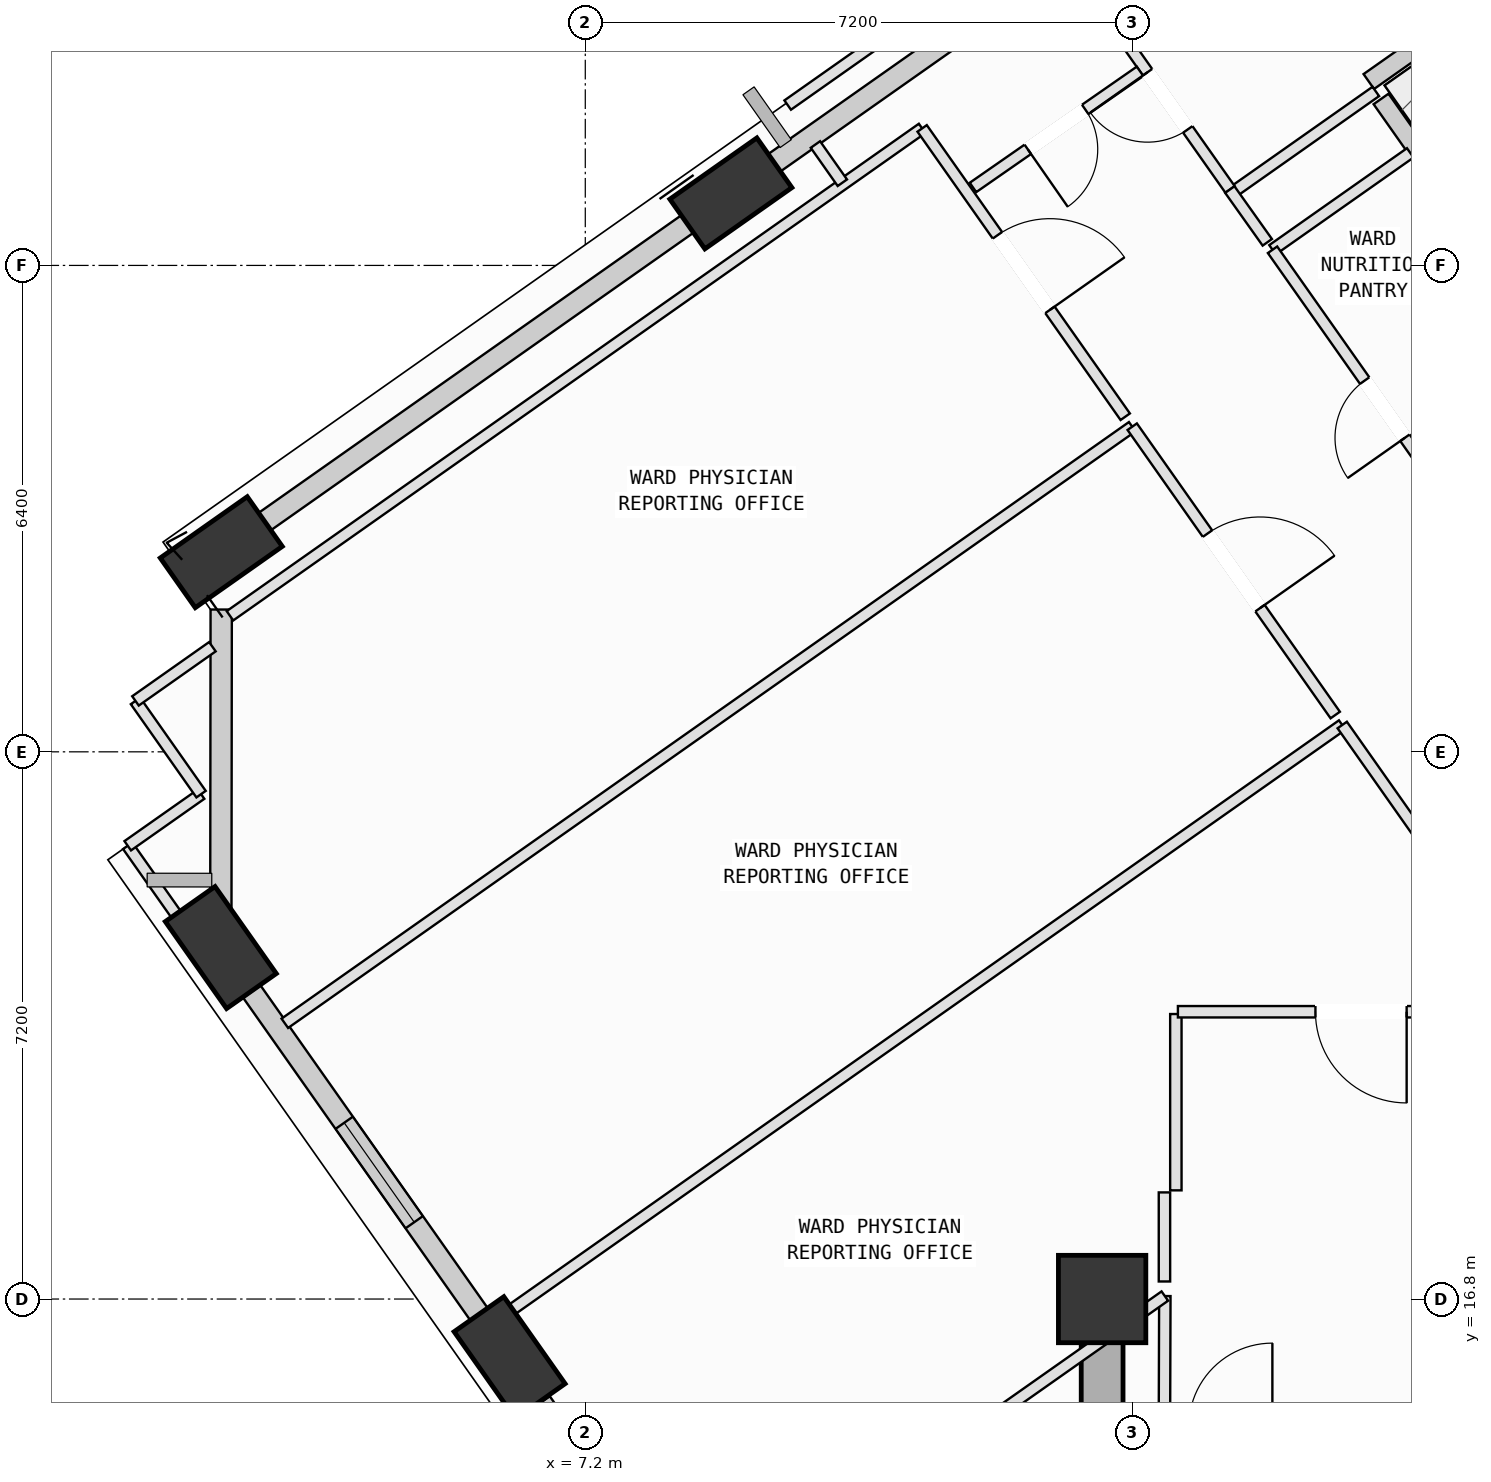
"""IFC4 building model, lengths in metres.
Left out: names, types, materials, properties, quantities, classifications, styles, units other than length and angle.
Written with IfcOpenShell. Run it as: python <this file> out.ifc"""

import sys

from ifc_helpers import new_model, si_unit, direction, frame, frame_2d, origin, origin_2d, place, context, subcontext, project, spatial, rectangle, extrude, element, fill, save


model = new_model("IFC4")
c1 = context("Model", 3, precision=1e-05, world=origin(), true_north=direction((0.0, 1.0)))
c2 = subcontext(c1, "Body", "Model", "MODEL_VIEW")
j1 = project(units=[si_unit("LENGTHUNIT", "METRE"), si_unit("PLANEANGLEUNIT", "RADIAN")], contexts=[c1])
p1 = place(None, origin())
s1 = spatial("IfcSite", under=j1, at=p1, CompositionType="ELEMENT")
p2 = place(p1, origin())
s2 = spatial("IfcBuilding", under=s1, at=p2, CompositionType="ELEMENT")
p3 = place(p2, frame((0.0, 0.0, 173.8)))
s3 = spatial("IfcBuildingStorey", under=s2, at=p3, CompositionType="ELEMENT", Elevation=173.8)
p4 = place(p3, frame((14.0, 16.8, 0.0), z_axis=(0.0, 0.0, 1.0), x_axis=(1.0, 0.0, 0.0)))
e1 = element("IfcColumn", 1, at=p4, inside=s3, PredefinedType="COLUMN", context=c2, shape_type="SweptSolid", body=[
    extrude(rectangle(XDim=1.15, YDim=1.15, at=origin_2d()), origin(), (0.0, 0.0, 1.0), 4.0),
])
p5 = place(p3, frame((9.115, 31.348, 0.002), z_axis=(-0.026186113544, -0.101159812183, 0.99452550488), x_axis=(0.935042033919, 0.349395563353, 0.060159247944)))
e2 = element("IfcColumn", 2, at=p5, inside=s3, PredefinedType="COLUMN", context=c2, shape_type="SweptSolid", body=[
    extrude(rectangle(XDim=1.4, YDim=0.8, at=origin_2d()), origin(), (0.0, 0.0, 1.0), 4.018),
])
p6 = place(p3, frame((2.411, 26.627, 0.002), z_axis=(-0.006482618954, -0.12825891894, 0.991719529587), x_axis=(0.845426180115, 0.528950032899, 0.07393535469)))
e3 = element("IfcColumn", 3, at=p6, inside=s3, PredefinedType="COLUMN", context=c2, shape_type="SweptSolid", body=[
    extrude(rectangle(XDim=1.4, YDim=0.8, at=origin_2d()), origin(), (0.0, 0.0, 1.0), 4.03),
])
p7 = place(p3, frame((2.405, 21.425, 0.002), z_axis=(0.014902854582, -0.128128200983, 0.991645636827), x_axis=(-0.665540007245, 0.738872506532, 0.105469985527)))
e4 = element("IfcColumn", 4, at=p7, inside=s3, PredefinedType="COLUMN", context=c2, shape_type="SweptSolid", body=[
    extrude(rectangle(XDim=1.4, YDim=0.8, at=origin_2d()), origin(), (0.0, 0.0, 1.0), 4.03),
])
p8 = place(p3, frame((6.204, 16.028, 0.002), z_axis=(0.037064026692, -0.112465966428, 0.992964080076), x_axis=(-0.800913109409, 0.590900661619, 0.096822514295)))
e5 = element("IfcColumn", 5, at=p8, inside=s3, PredefinedType="COLUMN", context=c2, shape_type="SweptSolid", body=[
    extrude(rectangle(XDim=1.4, YDim=0.8, at=origin_2d()), origin(), (0.0, 0.0, 1.0), 4.025),
])
p9 = place(p3, frame((17.67, 32.59, 0.0), z_axis=(0.0, 0.0, 1.0), x_axis=(0.57573667461, -0.817635176292, 0.0)))
e6 = element("IfcWall", 6, at=p9, inside=s3, PredefinedType="SOLIDWALL", context=c2, shape_type="SweptSolid", body=[
    extrude(rectangle(XDim=6.96, YDim=0.24, at=frame_2d((3.48, 0.0))), origin(), (0.0, 0.0, 1.0), 3.265),
])
p10 = place(p9, frame((2.93, 0.0, 0.0)))
e7 = element("IfcOpeningElement", 7, at=p10, cuts=e6, PredefinedType="OPENING", context=c2, shape_type="SweptSolid", body=[
    extrude(rectangle(XDim=1.1, YDim=2.15, at=frame_2d((0.55, 1.075))), frame((0.0, 0.13, 0.0), z_axis=(0.0, -1.0, 0.0), x_axis=(1.0, 0.0, 0.0)), (0.0, 0.0, 1.0), 0.26),
])
p11 = place(p3, frame((19.553, 34.259, 0.0), z_axis=(0.0, 0.0, 1.0), x_axis=(-0.817627652567, -0.575747359314, 0.0)))
e8 = element("IfcWall", 8, at=p11, inside=s3, PredefinedType="SOLIDWALL", context=c2, shape_type="SweptSolid", body=[
    extrude(rectangle(XDim=2.5, YDim=0.24, at=frame_2d((1.25, 0.0))), origin(), (0.0, 0.0, 1.0), 3.265),
])
p12 = place(p3, frame((9.375, 31.531, 0.0), z_axis=(0.0, 0.0, 1.0), x_axis=(0.817661605139, 0.575699139726, 0.0)))
e9 = element("IfcWall", 9, at=p12, inside=s3, PredefinedType="SOLIDWALL", context=c2, shape_type="SweptSolid", body=[
    extrude(rectangle(XDim=7.23, YDim=0.28, at=frame_2d((3.615, 0.0))), origin(), (0.0, 0.0, 1.0), 3.265),
])
p13 = place(p3, frame((2.65, 26.795, 0.0), z_axis=(0.0, 0.0, 1.0), x_axis=(0.817644825683, 0.575722970737, 0.0)))
e10 = element("IfcWall", 10, at=p13, inside=s3, PredefinedType="SOLIDWALL", context=c2, shape_type="SweptSolid", body=[
    extrude(rectangle(XDim=7.27, YDim=0.28, at=frame_2d((3.635, 0.0))), origin(), (0.0, 0.0, 1.0), 3.265),
])
p14 = place(p3, frame((2.405, 21.662, 0.0), z_axis=(0.0, 0.0, 1.0), x_axis=(0.001217602159, 0.999999258722, 0.0)))
e11 = element("IfcWall", 11, at=p14, inside=s3, PredefinedType="SOLIDWALL", context=c2, shape_type="SweptSolid", body=[
    extrude(rectangle(XDim=4.211, YDim=0.28, at=frame_2d((2.105, 0.0))), origin(), (0.0, 0.0, 1.0), 3.265),
])
p15 = place(p3, frame((6.053, 16.243, 0.0), z_axis=(0.0, 0.0, 1.0), x_axis=(-0.575713674911, 0.817651371014, 0.0)))
e12 = element("IfcWall", 12, at=p15, inside=s3, PredefinedType="SOLIDWALL", context=c2, shape_type="SweptSolid", body=[
    extrude(rectangle(XDim=5.628, YDim=0.28, at=frame_2d((2.814, 0.0))), origin(), (0.0, 0.0, 1.0), 3.265),
])
p16 = place(p15, frame((1.917, 0.0, 0.75)))
e13 = element("IfcOpeningElement", 13, at=p16, cuts=e12, PredefinedType="OPENING", context=c2, shape_type="SweptSolid", body=[
    extrude(rectangle(XDim=1.6, YDim=1.95, at=frame_2d((0.8, 0.975))), frame((0.0, 0.15, 0.0), z_axis=(0.0, -1.0, 0.0), x_axis=(1.0, 0.0, 0.0)), (0.0, 0.0, 1.0), 0.3),
])
p17 = place(p3, frame((9.878, 10.81, 0.0), z_axis=(0.0, 0.0, 1.0), x_axis=(-0.575714474807, 0.817650807801, 0.0)))
e14 = element("IfcWall", 14, at=p17, inside=s3, PredefinedType="SOLIDWALL", context=c2, shape_type="SweptSolid", body=[
    extrude(rectangle(XDim=5.662, YDim=0.28, at=frame_2d((2.831, 0.0))), origin(), (0.0, 0.0, 1.0), 3.265),
])
p18 = place(p17, frame((3.056, 0.0, 0.75)))
e15 = element("IfcOpeningElement", 15, at=p18, cuts=e14, PredefinedType="OPENING", context=c2, shape_type="SweptSolid", body=[
    extrude(rectangle(XDim=2.0, YDim=1.95, at=frame_2d((1.0, 0.975))), frame((0.0, 0.15, 0.0), z_axis=(0.0, -1.0, 0.0), x_axis=(1.0, 0.0, 0.0)), (0.0, 0.0, 1.0), 0.3),
])
p19 = place(p3, frame((14.0, 16.8, 0.0), z_axis=(0.0, 0.0, 1.0), x_axis=(0.0, -1.0, 0.0)))
e16 = element("IfcWall", 16, at=p19, inside=s3, PredefinedType="SHEAR", context=c2, shape_type="SweptSolid", body=[
    extrude(rectangle(XDim=9.0, YDim=0.55, at=frame_2d((4.5, 0.0))), origin(), (0.0, 0.0, 1.0), 3.78),
])
p20 = place(p3, frame((14.825, 16.839, 0.0), z_axis=(0.0, 0.0, 1.0), x_axis=(-0.003092131167, -0.999995219351, 0.0)))
e17 = element("IfcWall", 17, at=p20, inside=s3, PredefinedType="PARTITIONING", context=c2, shape_type="SweptSolid", body=[
    extrude(rectangle(XDim=1.579, YDim=0.15, at=frame_2d((0.79, 0.0))), origin(), (0.0, 0.0, 1.0), 3.78),
])
p21 = place(p3, frame((8.774, 12.579, 0.0), z_axis=(0.0, 0.0, 1.0), x_axis=(0.817686785851, 0.575663374069, 0.0)))
e18 = element("IfcWall", 18, at=p21, inside=s3, PredefinedType="PARTITIONING", context=c2, shape_type="SweptSolid", body=[
    extrude(rectangle(XDim=7.4, YDim=0.15, at=frame_2d((3.7, 0.0))), origin(), (0.0, 0.0, 1.0), 3.78),
])
p22 = place(p21, frame((3.1, 0.0, 0.0)))
e19 = element("IfcOpeningElement", 19, at=p22, cuts=e18, PredefinedType="OPENING", context=c2, shape_type="SweptSolid", body=[
    extrude(rectangle(XDim=1.2, YDim=2.15, at=frame_2d((0.6, 1.075))), frame((0.0, 0.085, 0.0), z_axis=(0.0, -1.0, 0.0), x_axis=(1.0, 0.0, 0.0)), (0.0, 0.0, 1.0), 0.17),
])
p23 = place(p3, frame((14.97, 20.55, 0.0), z_axis=(0.0, 0.0, 1.0), x_axis=(0.0, -1.0, 0.0)))
e20 = element("IfcWall", 20, at=p23, inside=s3, PredefinedType="PARTITIONING", context=c2, shape_type="SweptSolid", body=[
    extrude(rectangle(XDim=2.32, YDim=0.15, at=frame_2d((1.16, 0.0))), origin(), (0.0, 0.0, 1.0), 3.78),
])
p24 = place(p3, frame((14.82, 18.203, 0.0), z_axis=(0.0, 0.0, 1.0), x_axis=(0.0, -1.0, 0.0)))
e21 = element("IfcWall", 21, at=p24, inside=s3, PredefinedType="PARTITIONING", context=c2, shape_type="SweptSolid", body=[
    extrude(rectangle(XDim=1.172, YDim=0.15, at=frame_2d((0.586, 0.0))), origin(), (0.0, 0.0, 1.0), 3.78),
])
p25 = place(p3, frame((6.43, 15.308, 0.0), z_axis=(0.0, 0.0, 1.0), x_axis=(-0.575413328373, 0.817862764485, 0.0)))
e22 = element("IfcWall", 22, at=p25, inside=s3, PredefinedType="PARTITIONING", context=c2, shape_type="SweptSolid", body=[
    extrude(rectangle(XDim=0.982, YDim=0.15, at=frame_2d((0.491, 0.0))), origin(), (0.0, 0.0, 1.0), 3.265),
])
p26 = place(p3, frame((6.01, 16.504, 0.0), z_axis=(0.0, 0.0, 1.0), x_axis=(0.817682801661, 0.575669033272, 0.0)))
e23 = element("IfcWall", 23, at=p26, inside=s3, PredefinedType="PARTITIONING", context=c2, shape_type="SweptSolid", body=[
    extrude(rectangle(XDim=13.635, YDim=0.15, at=frame_2d((6.817, 0.0))), origin(), (0.0, 0.0, 1.0), 3.78),
])
p27 = place(p3, frame((17.159, 24.353, 0.0), z_axis=(0.0, 0.0, 1.0), x_axis=(0.575775132448, -0.817608094905, 0.0)))
e24 = element("IfcWall", 24, at=p27, inside=s3, PredefinedType="PARTITIONING", context=c2, shape_type="SweptSolid", body=[
    extrude(rectangle(XDim=4.615, YDim=0.15, at=frame_2d((2.307, 0.0))), origin(), (0.0, 0.0, 1.0), 3.78),
])
p28 = place(p3, frame((19.816, 20.58, 0.0), z_axis=(0.0, 0.0, 1.0), x_axis=(-1.0, 0.0, 0.0)))
e25 = element("IfcWall", 25, at=p28, inside=s3, PredefinedType="PARTITIONING", context=c2, shape_type="SweptSolid", body=[
    extrude(rectangle(XDim=4.819, YDim=0.15, at=frame_2d((2.409, 0.0))), origin(), (0.0, 0.0, 1.0), 3.78),
])
p29 = place(p28, frame((1.81, 0.0, 0.0)))
e26 = element("IfcOpeningElement", 26, at=p29, cuts=e25, PredefinedType="OPENING", context=c2, shape_type="SweptSolid", body=[
    extrude(rectangle(XDim=1.2, YDim=2.15, at=frame_2d((0.6, 1.075))), frame((0.0, 0.085, 0.0), z_axis=(0.0, -1.0, 0.0), x_axis=(1.0, 0.0, 0.0)), (0.0, 0.0, 1.0), 0.17),
])
p30 = place(p3, frame((3.247, 20.428, 0.0), z_axis=(0.0, 0.0, 1.0), x_axis=(0.817649087701, 0.575716917749, 0.0)))
e27 = element("IfcWall", 27, at=p30, inside=s3, PredefinedType="PARTITIONING", context=c2, shape_type="SweptSolid", body=[
    extrude(rectangle(XDim=13.635, YDim=0.15, at=frame_2d((6.818, 0.0))), origin(), (0.0, 0.0, 1.0), 3.78),
])
p31 = place(p3, frame((14.396, 28.278, 0.0), z_axis=(0.0, 0.0, 1.0), x_axis=(0.575625036634, -0.817713774618, 0.0)))
e28 = element("IfcWall", 28, at=p31, inside=s3, PredefinedType="PARTITIONING", context=c2, shape_type="SweptSolid", body=[
    extrude(rectangle(XDim=4.64, YDim=0.15, at=frame_2d((2.32, 0.0))), origin(), (0.0, 0.0, 1.0), 3.78),
])
p32 = place(p31, frame((1.72, 0.0, 0.0)))
e29 = element("IfcOpeningElement", 29, at=p32, cuts=e28, PredefinedType="OPENING", context=c2, shape_type="SweptSolid", body=[
    extrude(rectangle(XDim=1.2, YDim=2.15, at=frame_2d((0.6, 1.075))), frame((0.0, 0.085, 0.0), z_axis=(0.0, -1.0, 0.0), x_axis=(1.0, 0.0, 0.0)), (0.0, 0.0, 1.0), 0.17),
])
p33 = place(p3, frame((2.525, 25.79, 0.0), z_axis=(0.0, 0.0, 1.0), x_axis=(0.817633687165, 0.575738789394, 0.0)))
e30 = element("IfcWall", 30, at=p33, inside=s3, PredefinedType="PARTITIONING", context=c2, shape_type="SweptSolid", body=[
    extrude(rectangle(XDim=11.138, YDim=0.15, at=frame_2d((5.569, 0.0))), origin(), (0.0, 0.0, 1.0), 3.265),
])
p34 = place(p3, frame((11.632, 32.203, 0.0), z_axis=(0.0, 0.0, 1.0), x_axis=(0.575790507785, -0.817597267085, 0.0)))
e31 = element("IfcWall", 31, at=p34, inside=s3, PredefinedType="PARTITIONING", context=c2, shape_type="SweptSolid", body=[
    extrude(rectangle(XDim=4.64, YDim=0.15, at=frame_2d((2.32, 0.0))), origin(), (0.0, 0.0, 1.0), 3.78),
])
p35 = place(p34, frame((1.72, 0.0, 0.0)))
e32 = element("IfcOpeningElement", 32, at=p35, cuts=e31, PredefinedType="OPENING", context=c2, shape_type="SweptSolid", body=[
    extrude(rectangle(XDim=1.2, YDim=2.15, at=frame_2d((0.6, 1.075))), frame((0.0, 0.085, 0.0), z_axis=(0.0, -1.0, 0.0), x_axis=(1.0, 0.0, 0.0)), (0.0, 0.0, 1.0), 0.17),
])
p36 = place(p3, frame((2.625, 20.713, 0.0), z_axis=(0.0, 0.0, 1.0), x_axis=(-0.575960921974, 0.817477226813, 0.0)))
e33 = element("IfcWall", 33, at=p36, inside=s3, PredefinedType="PARTITIONING", context=c2, shape_type="SweptSolid", body=[
    extrude(rectangle(XDim=2.509, YDim=0.15, at=frame_2d((1.254, 0.0))), origin(), (0.0, 0.0, 1.0), 3.265),
])
p37 = place(p3, frame((1.18, 22.764, 0.0), z_axis=(0.0, 0.0, 1.0), x_axis=(0.817781175835, 0.575529276796, 0.0)))
e34 = element("IfcWall", 34, at=p37, inside=s3, PredefinedType="PARTITIONING", context=c2, shape_type="SweptSolid", body=[
    extrude(rectangle(XDim=1.18, YDim=0.15, at=frame_2d((0.59, 0.0))), origin(), (0.0, 0.0, 1.0), 3.78),
])
p38 = place(p3, frame((2.145, 23.443, 0.0), z_axis=(0.0, 0.0, 1.0), x_axis=(-0.575372446457, 0.817891525728, 0.0)))
e35 = element("IfcWall", 35, at=p38, inside=s3, PredefinedType="PARTITIONING", context=c2, shape_type="SweptSolid", body=[
    extrude(rectangle(XDim=1.5, YDim=0.15, at=frame_2d((0.75, 0.0))), origin(), (0.0, 0.0, 1.0), 3.78),
])
p39 = place(p3, frame((1.282, 24.67, 0.0), z_axis=(0.0, 0.0, 1.0), x_axis=(0.817421231172, 0.576040389929, 0.0)))
e36 = element("IfcWall", 36, at=p39, inside=s3, PredefinedType="PARTITIONING", context=c2, shape_type="SweptSolid", body=[
    extrude(rectangle(XDim=1.238, YDim=0.15, at=frame_2d((0.619, 0.0))), origin(), (0.0, 0.0, 1.0), 3.78),
])
p40 = place(p3, frame((16.242, 30.606, 0.0), z_axis=(0.0, 0.0, 1.0), x_axis=(0.817800657238, 0.575501594281, 0.0)))
e37 = element("IfcWall", 37, at=p40, inside=s3, PredefinedType="PARTITIONING", context=c2, shape_type="SweptSolid", body=[
    extrude(rectangle(XDim=2.216, YDim=0.15, at=frame_2d((1.108, 0.0))), origin(), (0.0, 0.0, 1.0), 3.78),
])
p41 = place(p3, frame((19.196, 26.411, 0.0), z_axis=(0.0, 0.0, 1.0), x_axis=(-0.575756218834, 0.817621413903, 0.0)))
e38 = element("IfcWall", 38, at=p41, inside=s3, PredefinedType="PARTITIONING", context=c2, shape_type="SweptSolid", body=[
    extrude(rectangle(XDim=5.131, YDim=0.15, at=frame_2d((2.565, 0.0))), origin(), (0.0, 0.0, 1.0), 3.78),
])
p42 = place(p41, frame((2.105, 0.0, 0.0)))
e39 = element("IfcOpeningElement", 39, at=p42, cuts=e38, PredefinedType="OPENING", context=c2, shape_type="SweptSolid", body=[
    extrude(rectangle(XDim=0.92, YDim=2.1, at=frame_2d((0.46, 1.05))), frame((0.0, 0.085, 0.0), z_axis=(0.0, -1.0, 0.0), x_axis=(1.0, 0.0, 0.0)), (0.0, 0.0, 1.0), 0.17),
])
p43 = place(p3, frame((17.601, 32.689, 0.0), z_axis=(0.0, 0.0, 1.0), x_axis=(-0.817670092485, -0.575687085017, 0.0)))
e40 = element("IfcWall", 40, at=p43, inside=s3, PredefinedType="PARTITIONING", context=c2, shape_type="SweptSolid", body=[
    extrude(rectangle(XDim=2.31, YDim=0.15, at=frame_2d((1.155, 0.0))), origin(), (0.0, 0.0, 1.0), 3.78),
])
p44 = place(p3, frame((15.683, 31.4, 0.0), z_axis=(0.0, 0.0, 1.0), x_axis=(-0.575807168993, 0.817585533223, 0.0)))
e41 = element("IfcWall", 41, at=p44, inside=s3, PredefinedType="PARTITIONING", context=c2, shape_type="SweptSolid", body=[
    extrude(rectangle(XDim=3.623, YDim=0.15, at=frame_2d((1.812, 0.0))), origin(), (0.0, 0.0, 1.0), 3.78),
])
p45 = place(p44, frame((0.966, 0.0, 0.0)))
e42 = element("IfcOpeningElement", 42, at=p45, cuts=e41, PredefinedType="OPENING", context=c2, shape_type="SweptSolid", body=[
    extrude(rectangle(XDim=0.92, YDim=2.1, at=frame_2d((0.46, 1.05))), frame((0.0, 0.085, 0.0), z_axis=(0.0, -1.0, 0.0), x_axis=(1.0, 0.0, 0.0)), (0.0, 0.0, 1.0), 0.17),
])
p46 = place(p3, frame((14.499, 32.954, 0.0), z_axis=(0.0, 0.0, 1.0), x_axis=(-0.821074321589, -0.570821301658, 0.0)))
e43 = element("IfcWall", 43, at=p46, inside=s3, PredefinedType="PARTITIONING", context=c2, shape_type="SweptSolid", body=[
    extrude(rectangle(XDim=2.677, YDim=0.15, at=frame_2d((1.338, 0.0))), origin(), (0.0, 0.0, 1.0), 3.78),
])
p47 = place(p46, frame((0.878, 0.0, 0.0)))
e44 = element("IfcOpeningElement", 44, at=p47, cuts=e43, PredefinedType="OPENING", context=c2, shape_type="SweptSolid", body=[
    extrude(rectangle(XDim=0.92, YDim=2.1, at=frame_2d((0.46, 1.05))), frame((0.0, 0.085, 0.0), z_axis=(0.0, -1.0, 0.0), x_axis=(1.0, 0.0, 0.0)), (0.0, 0.0, 1.0), 0.17),
])
p48 = place(p3, frame((10.582, 31.488, 0.0), z_axis=(0.0, 0.0, 1.0), x_axis=(-0.57559173151, 0.817737218559, 0.0)))
e45 = element("IfcWall", 45, at=p48, inside=s3, PredefinedType="PARTITIONING", context=c2, shape_type="SweptSolid", body=[
    extrude(rectangle(XDim=0.615, YDim=0.15, at=frame_2d((0.308, 0.0))), origin(), (0.0, 0.0, 1.0), 3.78),
])
p49 = place(p3, frame((9.863, 32.51, 0.0), z_axis=(0.0, 0.0, 1.0), x_axis=(0.817598024739, 0.575789431948, 0.0)))
e46 = element("IfcWall", 46, at=p49, inside=s3, PredefinedType="PARTITIONING", context=c2, shape_type="SweptSolid", body=[
    extrude(rectangle(XDim=5.74, YDim=0.15, at=frame_2d((2.87, 0.0))), origin(), (0.0, 0.0, 1.0), 3.78),
])
p50 = place(p3, frame((15.68, 31.398, 0.0), z_axis=(0.0, 0.0, 1.0), x_axis=(0.579337524754, -0.815087745223, 0.0)))
e47 = element("IfcWall", 47, at=p50, inside=s3, PredefinedType="PARTITIONING", context=c2, shape_type="SweptSolid", body=[
    extrude(rectangle(XDim=0.851, YDim=0.15, at=frame_2d((0.426, 0.0))), origin(), (0.0, 0.0, 1.0), 3.78),
])
p51 = place(p16, origin())
e48 = element("IfcWindow", 48, at=p51, inside=s3, PartitioningType="SINGLE_PANEL", PredefinedType="WINDOW", context=c2, shape_type="SweptSolid", body=[
    extrude(rectangle(XDim=1.6, YDim=1.95, at=frame_2d((0.8, 0.975))), frame((0.0, 0.03, 0.0), z_axis=(0.0, -1.0, 0.0), x_axis=(1.0, 0.0, 0.0)), (0.0, 0.0, 1.0), 0.06),
])
fill(e13, e48)
p52 = place(p29, origin())
e49 = element("IfcDoor", 49, at=p52, inside=s3, OperationType="SINGLE_SWING_LEFT", PredefinedType="DOOR", context=c2, shape_type="SweptSolid", body=[
    extrude(rectangle(XDim=1.2, YDim=2.15, at=frame_2d((0.6, 1.075))), frame((0.0, 0.025, 0.0), z_axis=(0.0, -1.0, 0.0), x_axis=(1.0, 0.0, 0.0)), (0.0, 0.0, 1.0), 0.05),
])
fill(e26, e49)
p53 = place(p32, origin())
e50 = element("IfcDoor", 50, at=p53, inside=s3, OperationType="SINGLE_SWING_RIGHT", PredefinedType="DOOR", context=c2, shape_type="SweptSolid", body=[
    extrude(rectangle(XDim=1.2, YDim=2.15, at=frame_2d((0.6, 1.075))), frame((0.0, 0.025, 0.0), z_axis=(0.0, -1.0, 0.0), x_axis=(1.0, 0.0, 0.0)), (0.0, 0.0, 1.0), 0.05),
])
fill(e29, e50)
p54 = place(p35, origin())
e51 = element("IfcDoor", 51, at=p54, inside=s3, OperationType="SINGLE_SWING_RIGHT", PredefinedType="DOOR", context=c2, shape_type="SweptSolid", body=[
    extrude(rectangle(XDim=1.2, YDim=2.15, at=frame_2d((0.6, 1.075))), frame((0.0, 0.025, 0.0), z_axis=(0.0, -1.0, 0.0), x_axis=(1.0, 0.0, 0.0)), (0.0, 0.0, 1.0), 0.05),
])
fill(e32, e51)
p55 = place(p42, origin())
e52 = element("IfcDoor", 52, at=p55, inside=s3, OperationType="SINGLE_SWING_LEFT", PredefinedType="DOOR", context=c2, shape_type="SweptSolid", body=[
    extrude(rectangle(XDim=0.92, YDim=2.1, at=frame_2d((0.46, 1.05))), frame((0.0, 0.025, 0.0), z_axis=(0.0, -1.0, 0.0), x_axis=(1.0, 0.0, 0.0)), (0.0, 0.0, 1.0), 0.05),
])
fill(e39, e52)
p56 = place(p45, origin())
e53 = element("IfcDoor", 53, at=p56, inside=s3, OperationType="SINGLE_SWING_RIGHT", PredefinedType="DOOR", context=c2, shape_type="SweptSolid", body=[
    extrude(rectangle(XDim=0.92, YDim=2.1, at=frame_2d((0.46, 1.05))), frame((0.0, 0.025, 0.0), z_axis=(0.0, -1.0, 0.0), x_axis=(1.0, 0.0, 0.0)), (0.0, 0.0, 1.0), 0.05),
])
fill(e42, e53)
p57 = place(p47, origin())
e54 = element("IfcDoor", 54, at=p57, inside=s3, OperationType="SINGLE_SWING_RIGHT", PredefinedType="DOOR", context=c2, shape_type="SweptSolid", body=[
    extrude(rectangle(XDim=0.92, YDim=2.1, at=frame_2d((0.46, 1.05))), frame((0.0, 0.025, 0.0), z_axis=(0.0, -1.0, 0.0), x_axis=(1.0, 0.0, 0.0)), (0.0, 0.0, 1.0), 0.05),
])
fill(e44, e54)
save(model, sys.argv[1])
